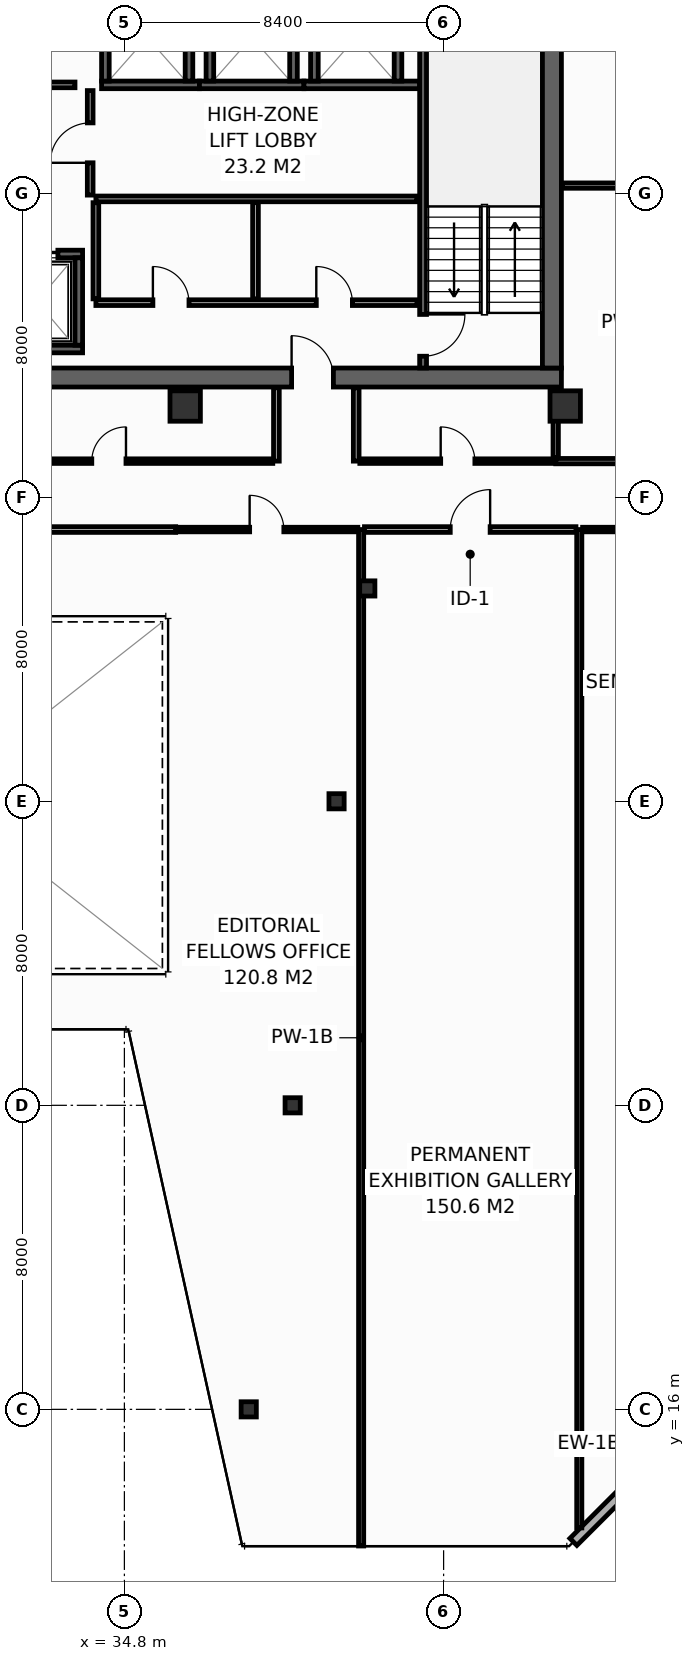
"""IFC4 building model, lengths in metres.
Left out: names, types, materials, properties, quantities, classifications, styles, units other than length and angle.
Written with IfcOpenShell. Run it as: python <this file> out.ifc"""

import sys

from ifc_helpers import new_model, si_unit, direction, frame, frame_2d, origin, origin_2d, place, context, subcontext, project, spatial, rectangle, hollow_rectangle, extrude, element, fill, save


model = new_model("IFC4")
c1 = context("Model", 3, precision=1e-05, world=origin(), true_north=direction((0.0, 1.0)))
c2 = subcontext(c1, "Body", "Model", "MODEL_VIEW")
j1 = project(units=[si_unit("LENGTHUNIT", "METRE"), si_unit("PLANEANGLEUNIT", "RADIAN")], contexts=[c1])
p1 = place(None, origin())
s1 = spatial("IfcSite", under=j1, at=p1, CompositionType="ELEMENT")
p2 = place(p1, origin())
s2 = spatial("IfcBuilding", under=s1, at=p2, CompositionType="ELEMENT")
p3 = place(p2, frame((0.0, 0.0, 186.6)))
s3 = spatial("IfcBuildingStorey", under=s2, at=p3, CompositionType="ELEMENT", Elevation=186.6)
p4 = place(p3, frame((13.6, 43.15, 0.0), z_axis=(0.0, 0.0, 1.0), x_axis=(1.0, 0.0, 0.0)))
e1 = element("IfcWall", 1, at=p4, inside=s3, PredefinedType="SHEAR", context=c2, shape_type="SweptSolid", body=[
    extrude(rectangle(XDim=32.7, YDim=0.5, at=frame_2d((16.35, 0.0))), origin(), (0.0, 0.0, 1.0), 3.55),
])
p5 = place(p4, frame((5.4, 0.0, 0.0)))
e2 = element("IfcOpeningElement", 2, at=p5, cuts=e1, PredefinedType="OPENING", context=c2, shape_type="SweptSolid", body=[
    extrude(rectangle(XDim=1.1, YDim=2.15, at=frame_2d((0.55, 1.075))), frame((0.0, 0.26, 0.0), z_axis=(0.0, -1.0, 0.0), x_axis=(1.0, 0.0, 0.0)), (0.0, 0.0, 1.0), 0.52),
])
p6 = place(p4, frame((25.6, 0.0, 0.0)))
e3 = element("IfcOpeningElement", 3, at=p6, cuts=e1, PredefinedType="OPENING", context=c2, shape_type="SweptSolid", body=[
    extrude(rectangle(XDim=1.1, YDim=2.15, at=frame_2d((0.55, 1.075))), frame((0.0, 0.26, 0.0), z_axis=(0.0, -1.0, 0.0), x_axis=(1.0, 0.0, 0.0)), (0.0, 0.0, 1.0), 0.52),
])
p7 = place(p3, frame((46.05, 43.4, 0.0), z_axis=(0.0, 0.0, 1.0), x_axis=(0.0, 1.0, 0.0)))
e4 = element("IfcWall", 4, at=p7, inside=s3, PredefinedType="SHEAR", context=c2, shape_type="SweptSolid", body=[
    extrude(rectangle(XDim=10.4, YDim=0.5, at=frame_2d((5.2, 0.0))), origin(), (0.0, 0.0, 1.0), 3.55),
])
for number, where, z_axis, x_axis in (
    (5, (36.4, 42.4, 0.0), (0.0, 0.0, 1.0), (1.0, 0.0, 0.0)),
    (6, (46.4, 42.4, 0.0), (0.0, 0.0, 1.0), (1.0, 0.0, 0.0)),
):
    element("IfcColumn", number, at=place(p3, frame(where, z_axis=z_axis, x_axis=x_axis)), inside=s3, PredefinedType="COLUMN", context=c2, shape_type="SweptSolid", body=[
        extrude(hollow_rectangle(XDim=0.8, YDim=0.8, WallThickness=0.036, at=origin_2d()), origin(), (0.0, 0.0, 1.0), 3.8),
    ])
for number, where, z_axis, x_axis in (
    (7, (38.072, 16.0, 0.0), (0.0, 0.0, 1.0), (1.0, 0.0, 0.0)),
    (8, (39.228, 24.0, 0.0), (0.0, 0.0, 1.0), (1.0, 0.0, 0.0)),
    (9, (40.383, 32.0, 0.0), (0.0, 0.0, 1.0), (1.0, 0.0, 0.0)),
    (10, (41.192, 37.6, 0.0), (0.0, 0.0, 1.0), (1.0, 0.0, 0.0)),
):
    element("IfcColumn", number, at=place(p3, frame(where, z_axis=z_axis, x_axis=x_axis)), inside=s3, PredefinedType="COLUMN", context=c2, shape_type="SweptSolid", body=[
        extrude(hollow_rectangle(XDim=0.4, YDim=0.4, WallThickness=0.016, at=origin_2d()), origin(), (0.0, 0.0, 1.0), 3.8),
    ])
p8 = place(p3, frame((31.125, 43.9, 0.0), z_axis=(0.0, 0.0, 1.0), x_axis=(1.0, 0.0, 0.0)))
e11 = element("IfcWall", 11, at=p8, inside=s3, PredefinedType="SHEAR", context=c2, shape_type="SweptSolid", body=[
    extrude(rectangle(XDim=2.575, YDim=0.2, at=frame_2d((1.288, 0.0))), origin(), (0.0, 0.0, 1.0), 3.55),
])
p9 = place(p3, frame((31.125, 46.4, 0.0), z_axis=(0.0, 0.0, 1.0), x_axis=(1.0, 0.0, 0.0)))
e12 = element("IfcWall", 12, at=p9, inside=s3, PredefinedType="SHEAR", context=c2, shape_type="SweptSolid", body=[
    extrude(rectangle(XDim=2.575, YDim=0.2, at=frame_2d((1.288, 0.0))), origin(), (0.0, 0.0, 1.0), 3.55),
])
p10 = place(p9, frame((0.825, 0.0, 0.0)))
e13 = element("IfcOpeningElement", 13, at=p10, cuts=e12, PredefinedType="OPENING", context=c2, shape_type="SweptSolid", body=[
    extrude(rectangle(XDim=1.1, YDim=2.2, at=frame_2d((0.55, 1.1))), frame((0.0, 0.11, 0.0), z_axis=(0.0, -1.0, 0.0), x_axis=(1.0, 0.0, 0.0)), (0.0, 0.0, 1.0), 0.22),
])
p11 = place(p3, frame((33.6, 44.0, 0.0), z_axis=(0.0, 0.0, 1.0), x_axis=(0.0, 1.0, 0.0)))
e14 = element("IfcWall", 14, at=p11, inside=s3, PredefinedType="SHEAR", context=c2, shape_type="SweptSolid", body=[
    extrude(rectangle(XDim=2.3, YDim=0.2, at=frame_2d((1.15, 0.0))), origin(), (0.0, 0.0, 1.0), 3.55),
])
p12 = place(p3, frame((34.2, 50.85, 0.0), z_axis=(0.0, 0.0, 1.0), x_axis=(1.0, 0.0, 0.0)))
e15 = element("IfcWall", 15, at=p12, inside=s3, PredefinedType="SHEAR", context=c2, shape_type="SweptSolid", body=[
    extrude(rectangle(XDim=2.575, YDim=0.2, at=frame_2d((1.288, 0.0))), origin(), (0.0, 0.0, 1.0), 3.55),
])
for number, where, z_axis, x_axis in (
    (16, (34.3, 50.95, 0.0), (0.0, 0.0, 1.0), (0.0, 1.0, 0.0)),
    (17, (36.5, 50.95, 0.0), (0.0, 0.0, 1.0), (0.0, 1.0, 0.0)),
):
    element("IfcWall", number, at=place(p3, frame(where, z_axis=z_axis, x_axis=x_axis)), inside=s3, PredefinedType="SHEAR", context=c2, shape_type="SweptSolid", body=[
        extrude(rectangle(XDim=2.3, YDim=0.2, at=frame_2d((1.15, 0.0))), origin(), (0.0, 0.0, 1.0), 3.55),
    ])
p13 = place(p3, frame((36.775, 50.85, 0.0), z_axis=(0.0, 0.0, 1.0), x_axis=(1.0, 0.0, 0.0)))
e18 = element("IfcWall", 18, at=p13, inside=s3, PredefinedType="SHEAR", context=c2, shape_type="SweptSolid", body=[
    extrude(rectangle(XDim=2.75, YDim=0.2, at=frame_2d((1.375, 0.0))), origin(), (0.0, 0.0, 1.0), 3.55),
])
for number, where, z_axis, x_axis in (
    (19, (37.05, 50.95, 0.0), (0.0, 0.0, 1.0), (0.0, 1.0, 0.0)),
    (20, (39.25, 50.95, 0.0), (0.0, 0.0, 1.0), (0.0, 1.0, 0.0)),
):
    element("IfcWall", number, at=place(p3, frame(where, z_axis=z_axis, x_axis=x_axis)), inside=s3, PredefinedType="SHEAR", context=c2, shape_type="SweptSolid", body=[
        extrude(rectangle(XDim=2.3, YDim=0.2, at=frame_2d((1.15, 0.0))), origin(), (0.0, 0.0, 1.0), 3.55),
    ])
p14 = place(p3, frame((39.525, 50.85, 0.0), z_axis=(0.0, 0.0, 1.0), x_axis=(1.0, 0.0, 0.0)))
e21 = element("IfcWall", 21, at=p14, inside=s3, PredefinedType="SHEAR", context=c2, shape_type="SweptSolid", body=[
    extrude(rectangle(XDim=3.045, YDim=0.2, at=frame_2d((1.522, 0.0))), origin(), (0.0, 0.0, 1.0), 3.55),
])
for number, where, z_axis, x_axis in (
    (22, (39.8, 50.95, 0.0), (0.0, 0.0, 1.0), (0.0, 1.0, 0.0)),
    (23, (42.0, 50.95, 0.0), (0.0, 0.0, 1.0), (0.0, 1.0, 0.0)),
):
    element("IfcWall", number, at=place(p3, frame(where, z_axis=z_axis, x_axis=x_axis)), inside=s3, PredefinedType="SHEAR", context=c2, shape_type="SweptSolid", body=[
        extrude(rectangle(XDim=2.3, YDim=0.2, at=frame_2d((1.15, 0.0))), origin(), (0.0, 0.0, 1.0), 3.55),
    ])
p15 = place(p3, frame((42.66, 53.8, 0.0), z_axis=(0.0, 0.0, 1.0), x_axis=(0.0, -1.0, 0.0)))
e24 = element("IfcWall", 24, at=p15, inside=s3, PredefinedType="SHEAR", context=c2, shape_type="SweptSolid", body=[
    extrude(rectangle(XDim=10.4, YDim=0.18, at=frame_2d((5.2, 0.0))), origin(), (0.0, 0.0, 1.0), 3.55),
])
p16 = place(p15, frame((8.99, 0.0, 0.0)))
e25 = element("IfcOpeningElement", 25, at=p16, cuts=e24, PredefinedType="OPENING", context=c2, shape_type="SweptSolid", body=[
    extrude(rectangle(XDim=1.1, YDim=2.15, at=frame_2d((0.55, 1.075))), frame((0.0, 0.1, 0.0), z_axis=(0.0, -1.0, 0.0), x_axis=(1.0, 0.0, 0.0)), (0.0, 0.0, 1.0), 0.2),
])
p17 = place(p3, frame((33.9, 47.95, 0.0), z_axis=(0.0, 0.0, 1.0), x_axis=(0.0, 1.0, 0.0)))
e26 = element("IfcWall", 26, at=p17, inside=s3, PredefinedType="PARTITIONING", context=c2, shape_type="SweptSolid", body=[
    extrude(rectangle(XDim=2.75, YDim=0.15, at=frame_2d((1.375, 0.0))), origin(), (0.0, 0.0, 1.0), 3.55),
])
p18 = place(p17, frame((0.85, 0.0, 0.0)))
e27 = element("IfcOpeningElement", 27, at=p18, cuts=e26, PredefinedType="OPENING", context=c2, shape_type="SweptSolid", body=[
    extrude(rectangle(XDim=1.05, YDim=2.15, at=frame_2d((0.525, 1.075))), frame((0.0, 0.085, 0.0), z_axis=(0.0, -1.0, 0.0), x_axis=(1.0, 0.0, 0.0)), (0.0, 0.0, 1.0), 0.17),
])
p19 = place(p3, frame((34.05, 45.12, 0.0), z_axis=(0.0, 0.0, 1.0), x_axis=(1.0, 0.0, 0.0)))
e28 = element("IfcWall", 28, at=p19, inside=s3, PredefinedType="PARTITIONING", context=c2, shape_type="SweptSolid", body=[
    extrude(rectangle(XDim=8.45, YDim=0.15, at=frame_2d((4.225, 0.0))), origin(), (0.0, 0.0, 1.0), 3.55),
])
p20 = place(p19, frame((1.5, 0.0, 0.0)))
e29 = element("IfcOpeningElement", 29, at=p20, cuts=e28, PredefinedType="OPENING", context=c2, shape_type="SweptSolid", body=[
    extrude(rectangle(XDim=0.95, YDim=2.15, at=frame_2d((0.475, 1.075))), frame((0.0, 0.085, 0.0), z_axis=(0.0, -1.0, 0.0), x_axis=(1.0, 0.0, 0.0)), (0.0, 0.0, 1.0), 0.17),
])
p21 = place(p19, frame((5.8, 0.0, 0.0)))
e30 = element("IfcOpeningElement", 30, at=p21, cuts=e28, PredefinedType="OPENING", context=c2, shape_type="SweptSolid", body=[
    extrude(rectangle(XDim=0.95, YDim=2.15, at=frame_2d((0.475, 1.075))), frame((0.0, 0.085, 0.0), z_axis=(0.0, -1.0, 0.0), x_axis=(1.0, 0.0, 0.0)), (0.0, 0.0, 1.0), 0.17),
])
p22 = place(p3, frame((34.05, 47.85, 0.0), z_axis=(0.0, 0.0, 1.0), x_axis=(1.0, 0.0, 0.0)))
e31 = element("IfcWall", 31, at=p22, inside=s3, PredefinedType="PARTITIONING", context=c2, shape_type="SweptSolid", body=[
    extrude(rectangle(XDim=8.45, YDim=0.15, at=frame_2d((4.225, 0.0))), origin(), (0.0, 0.0, 1.0), 3.55),
])
for number, where, z_axis, x_axis in (
    (32, (38.25, 45.22, 0.0), (0.0, 0.0, 1.0), (0.0, 1.0, 0.0)),
    (33, (34.05, 45.22, 0.0), (0.0, 0.0, 1.0), (0.0, 1.0, 0.0)),
):
    element("IfcWall", number, at=place(p3, frame(where, z_axis=z_axis, x_axis=x_axis)), inside=s3, PredefinedType="PARTITIONING", context=c2, shape_type="SweptSolid", body=[
        extrude(rectangle(XDim=2.53, YDim=0.15, at=frame_2d((1.265, 0.0))), origin(), (0.0, 0.0, 1.0), 3.55),
    ])
p23 = place(p3, frame((25.85, 50.85, 0.0), z_axis=(0.0, 0.0, 1.0), x_axis=(1.0, 0.0, 0.0)))
e34 = element("IfcWall", 34, at=p23, inside=s3, PredefinedType="PARTITIONING", context=c2, shape_type="SweptSolid", body=[
    extrude(rectangle(XDim=7.65, YDim=0.15, at=frame_2d((3.825, 0.0))), origin(), (0.0, 0.0, 1.0), 3.55),
])
p24 = place(p23, frame((1.25, 0.0, 0.0)))
e35 = element("IfcOpeningElement", 35, at=p24, cuts=e34, PredefinedType="OPENING", context=c2, shape_type="SweptSolid", body=[
    extrude(rectangle(XDim=0.95, YDim=2.15, at=frame_2d((0.475, 1.075))), frame((0.0, 0.085, 0.0), z_axis=(0.0, -1.0, 0.0), x_axis=(1.0, 0.0, 0.0)), (0.0, 0.0, 1.0), 0.17),
])
p25 = place(p3, frame((46.615, 12.513, 0.0), z_axis=(0.0, 0.0, 1.0), x_axis=(0.707135806771, 0.70707775441, 0.0)))
e36 = element("IfcWall", 36, at=p25, inside=s3, PredefinedType="STANDARD", context=c2, shape_type="SweptSolid", body=[
    extrude(rectangle(XDim=4.206, YDim=0.26, at=frame_2d((2.103, 0.0))), origin(), (0.0, 0.0, 1.0), 3.55),
])
p26 = place(p3, frame((46.15, 40.95, 0.0), z_axis=(0.0, 0.0, 1.0), x_axis=(1.0, 0.0, 0.0)))
e37 = element("IfcWall", 37, at=p26, inside=s3, PredefinedType="PARTITIONING", context=c2, shape_type="SweptSolid", body=[
    extrude(rectangle(XDim=4.05, YDim=0.14, at=frame_2d((2.025, 0.0))), origin(), (0.0, 0.0, 1.0), 3.55),
])
p27 = place(p3, frame((46.15, 41.04, 0.0), z_axis=(0.0, 0.0, 1.0), x_axis=(0.0, 1.0, 0.0)))
e38 = element("IfcWall", 38, at=p27, inside=s3, PredefinedType="PARTITIONING", context=c2, shape_type="SweptSolid", body=[
    extrude(rectangle(XDim=1.84, YDim=0.14, at=frame_2d((0.92, 0.0))), origin(), (0.0, 0.0, 1.0), 3.55),
])
p28 = place(p3, frame((46.32, 48.2, 0.0), z_axis=(0.0, 0.0, 1.0), x_axis=(1.0, 0.0, 0.0)))
e39 = element("IfcWall", 39, at=p28, inside=s3, PredefinedType="PARTITIONING", context=c2, shape_type="SweptSolid", body=[
    extrude(rectangle(XDim=3.88, YDim=0.14, at=frame_2d((1.94, 0.0))), origin(), (0.0, 0.0, 1.0), 3.55),
])
for number, where, z_axis, x_axis in (
    (40, (38.8, 40.95, 0.0), (0.0, 0.0, 1.0), (0.0, 1.0, 0.0)),
    (41, (40.9, 40.95, 0.0), (0.0, 0.0, 1.0), (0.0, 1.0, 0.0)),
):
    element("IfcWall", number, at=place(p3, frame(where, z_axis=z_axis, x_axis=x_axis)), inside=s3, PredefinedType="PARTITIONING", context=c2, shape_type="SweptSolid", body=[
        extrude(rectangle(XDim=1.93, YDim=0.15, at=frame_2d((0.965, 0.0))), origin(), (0.0, 0.0, 1.0), 3.55),
    ])
p29 = place(p3, frame((30.08, 40.95, 0.0), z_axis=(0.0, 0.0, 1.0), x_axis=(1.0, 0.0, 0.0)))
e42 = element("IfcWall", 42, at=p29, inside=s3, PredefinedType="PARTITIONING", context=c2, shape_type="SweptSolid", body=[
    extrude(rectangle(XDim=8.625, YDim=0.12, at=frame_2d((4.312, 0.0))), origin(), (0.0, 0.0, 1.0), 2.835),
])
p30 = place(p29, frame((3.862, 0.0, 0.0)))
e43 = element("IfcOpeningElement", 43, at=p30, cuts=e42, PredefinedType="OPENING", context=c2, shape_type="SweptSolid", body=[
    extrude(rectangle(XDim=0.9, YDim=2.1, at=frame_2d((0.45, 1.05))), frame((0.0, 0.07, 0.0), z_axis=(0.0, -1.0, 0.0), x_axis=(1.0, 0.0, 0.0)), (0.0, 0.0, 1.0), 0.14),
])
p31 = place(p3, frame((40.995, 40.95, 0.0), z_axis=(0.0, 0.0, 1.0), x_axis=(1.0, 0.0, 0.0)))
e44 = element("IfcWall", 44, at=p31, inside=s3, PredefinedType="PARTITIONING", context=c2, shape_type="SweptSolid", body=[
    extrude(rectangle(XDim=5.155, YDim=0.12, at=frame_2d((2.577, 0.0))), origin(), (0.0, 0.0, 1.0), 3.55),
])
p32 = place(p31, frame((2.128, 0.0, 0.0)))
e45 = element("IfcOpeningElement", 45, at=p32, cuts=e44, PredefinedType="OPENING", context=c2, shape_type="SweptSolid", body=[
    extrude(rectangle(XDim=0.9, YDim=2.1, at=frame_2d((0.45, 1.05))), frame((0.0, 0.07, 0.0), z_axis=(0.0, -1.0, 0.0), x_axis=(1.0, 0.0, 0.0)), (0.0, 0.0, 1.0), 0.14),
])
p33 = place(p3, frame((41.03, 12.405, 0.0), z_axis=(0.0, 0.0, 1.0), x_axis=(0.0, 1.0, 0.0)))
e46 = element("IfcWall", 46, at=p33, inside=s3, PredefinedType="PARTITIONING", context=c2, shape_type="SweptSolid", body=[
    extrude(rectangle(XDim=26.745, YDim=0.135, at=frame_2d((13.373, 0.0))), origin(), (0.0, 0.0, 1.0), 2.835),
])
p34 = place(p3, frame((46.77, 12.88, 0.0), z_axis=(0.0, 0.0, 1.0), x_axis=(0.0, 1.0, 0.0)))
e47 = element("IfcWall", 47, at=p34, inside=s3, PredefinedType="PARTITIONING", context=c2, shape_type="SweptSolid", body=[
    extrude(rectangle(XDim=26.27, YDim=0.135, at=frame_2d((13.135, 0.0))), origin(), (0.0, 0.0, 1.0), 2.835),
])
p35 = place(p3, frame((23.85, 39.15, 0.0), z_axis=(0.0, 0.0, 1.0), x_axis=(1.0, 0.0, 0.0)))
e48 = element("IfcWall", 48, at=p35, inside=s3, PredefinedType="PARTITIONING", context=c2, shape_type="SweptSolid", body=[
    extrude(rectangle(XDim=12.3, YDim=0.15, at=frame_2d((6.15, 0.0))), origin(), (0.0, 0.0, 1.0), 3.55),
])
p36 = place(p3, frame((36.15, 39.15, 0.0), z_axis=(0.0, 0.0, 1.0), x_axis=(1.0, 0.0, 0.0)))
e49 = element("IfcWall", 49, at=p36, inside=s3, PredefinedType="PARTITIONING", context=c2, shape_type="SweptSolid", body=[
    extrude(rectangle(XDim=4.792, YDim=0.12, at=frame_2d((2.396, 0.0))), origin(), (0.0, 0.0, 1.0), 2.835),
])
p37 = place(p36, frame((1.946, 0.0, 0.0)))
e50 = element("IfcOpeningElement", 50, at=p37, cuts=e49, PredefinedType="OPENING", context=c2, shape_type="SweptSolid", body=[
    extrude(rectangle(XDim=0.9, YDim=2.1, at=frame_2d((0.45, 1.05))), frame((0.0, 0.07, 0.0), z_axis=(0.0, -1.0, 0.0), x_axis=(1.0, 0.0, 0.0)), (0.0, 0.0, 1.0), 0.14),
])
p38 = place(p3, frame((41.117, 39.15, 0.0), z_axis=(0.0, 0.0, 1.0), x_axis=(1.0, 0.0, 0.0)))
e51 = element("IfcWall", 51, at=p38, inside=s3, PredefinedType="PARTITIONING", context=c2, shape_type="SweptSolid", body=[
    extrude(rectangle(XDim=5.565, YDim=0.15, at=frame_2d((2.783, 0.0))), origin(), (0.0, 0.0, 1.0), 3.55),
])
p39 = place(p38, frame((2.257, 0.0, 0.0)))
e52 = element("IfcOpeningElement", 52, at=p39, cuts=e51, PredefinedType="OPENING", context=c2, shape_type="SweptSolid", body=[
    extrude(rectangle(XDim=1.05, YDim=2.15, at=frame_2d((0.525, 1.075))), frame((0.0, 0.085, 0.0), z_axis=(0.0, -1.0, 0.0), x_axis=(1.0, 0.0, 0.0)), (0.0, 0.0, 1.0), 0.17),
])
p40 = place(p3, frame((46.857, 39.15, 0.0), z_axis=(0.0, 0.0, 1.0), x_axis=(1.0, 0.0, 0.0)))
e53 = element("IfcWall", 53, at=p40, inside=s3, PredefinedType="PARTITIONING", context=c2, shape_type="SweptSolid", body=[
    extrude(rectangle(XDim=6.809, YDim=0.12, at=frame_2d((3.404, 0.0))), origin(), (0.0, 0.0, 1.0), 3.035),
])
p41 = place(p40, frame((2.954, 0.0, 0.0)))
e54 = element("IfcOpeningElement", 54, at=p41, cuts=e53, PredefinedType="OPENING", context=c2, shape_type="SweptSolid", body=[
    extrude(rectangle(XDim=0.9, YDim=2.1, at=frame_2d((0.45, 1.05))), frame((0.0, 0.07, 0.0), z_axis=(0.0, -1.0, 0.0), x_axis=(1.0, 0.0, 0.0)), (0.0, 0.0, 1.0), 0.14),
])
p42 = place(p10, origin())
e55 = element("IfcDoor", 55, at=p42, inside=s3, OperationType="SLIDING_TO_LEFT", PredefinedType="DOOR", context=c2, shape_type="SweptSolid", body=[
    extrude(rectangle(XDim=1.1, YDim=2.2, at=frame_2d((0.55, 1.1))), frame((0.0, 0.025, 0.0), z_axis=(0.0, -1.0, 0.0), x_axis=(1.0, 0.0, 0.0)), (0.0, 0.0, 1.0), 0.05),
])
fill(e13, e55)
p43 = place(p16, origin())
e56 = element("IfcDoor", 56, at=p43, inside=s3, OperationType="SINGLE_SWING_LEFT", PredefinedType="DOOR", context=c2, shape_type="SweptSolid", body=[
    extrude(rectangle(XDim=1.1, YDim=2.15, at=frame_2d((0.55, 1.075))), frame((0.0, 0.025, 0.0), z_axis=(0.0, -1.0, 0.0), x_axis=(1.0, 0.0, 0.0)), (0.0, 0.0, 1.0), 0.05),
])
fill(e25, e56)
p44 = place(p6, origin())
e57 = element("IfcDoor", 57, at=p44, inside=s3, OperationType="SINGLE_SWING_LEFT", PredefinedType="DOOR", context=c2, shape_type="SweptSolid", body=[
    extrude(rectangle(XDim=1.1, YDim=2.15, at=frame_2d((0.55, 1.075))), frame((0.0, 0.025, 0.0), z_axis=(0.0, -1.0, 0.0), x_axis=(1.0, 0.0, 0.0)), (0.0, 0.0, 1.0), 0.05),
])
fill(e3, e57)
p45 = place(p18, origin())
e58 = element("IfcDoor", 58, at=p45, inside=s3, OperationType="SINGLE_SWING_LEFT", PredefinedType="DOOR", context=c2, shape_type="SweptSolid", body=[
    extrude(rectangle(XDim=1.05, YDim=2.15, at=frame_2d((0.525, 1.075))), frame((0.0, 0.025, 0.0), z_axis=(0.0, -1.0, 0.0), x_axis=(1.0, 0.0, 0.0)), (0.0, 0.0, 1.0), 0.05),
])
fill(e27, e58)
p46 = place(p20, origin())
e59 = element("IfcDoor", 59, at=p46, inside=s3, OperationType="SINGLE_SWING_LEFT", PredefinedType="DOOR", context=c2, shape_type="SweptSolid", body=[
    extrude(rectangle(XDim=0.95, YDim=2.15, at=frame_2d((0.475, 1.075))), frame((0.0, 0.025, 0.0), z_axis=(0.0, -1.0, 0.0), x_axis=(1.0, 0.0, 0.0)), (0.0, 0.0, 1.0), 0.05),
])
fill(e29, e59)
p47 = place(p21, origin())
e60 = element("IfcDoor", 60, at=p47, inside=s3, OperationType="SINGLE_SWING_LEFT", PredefinedType="DOOR", context=c2, shape_type="SweptSolid", body=[
    extrude(rectangle(XDim=0.95, YDim=2.15, at=frame_2d((0.475, 1.075))), frame((0.0, 0.025, 0.0), z_axis=(0.0, -1.0, 0.0), x_axis=(1.0, 0.0, 0.0)), (0.0, 0.0, 1.0), 0.05),
])
fill(e30, e60)
p48 = place(p30, origin())
e61 = element("IfcDoor", 61, at=p48, inside=s3, OperationType="SINGLE_SWING_RIGHT", PredefinedType="DOOR", context=c2, shape_type="SweptSolid", body=[
    extrude(rectangle(XDim=0.9, YDim=2.1, at=frame_2d((0.45, 1.05))), frame((0.0, 0.025, 0.0), z_axis=(0.0, -1.0, 0.0), x_axis=(1.0, 0.0, 0.0)), (0.0, 0.0, 1.0), 0.05),
])
fill(e43, e61)
p49 = place(p32, origin())
e62 = element("IfcDoor", 62, at=p49, inside=s3, OperationType="SINGLE_SWING_LEFT", PredefinedType="DOOR", context=c2, shape_type="SweptSolid", body=[
    extrude(rectangle(XDim=0.9, YDim=2.1, at=frame_2d((0.45, 1.05))), frame((0.0, 0.025, 0.0), z_axis=(0.0, -1.0, 0.0), x_axis=(1.0, 0.0, 0.0)), (0.0, 0.0, 1.0), 0.05),
])
fill(e45, e62)
p50 = place(p37, origin())
e63 = element("IfcDoor", 63, at=p50, inside=s3, OperationType="SINGLE_SWING_LEFT", PredefinedType="DOOR", context=c2, shape_type="SweptSolid", body=[
    extrude(rectangle(XDim=0.9, YDim=2.1, at=frame_2d((0.45, 1.05))), frame((0.0, 0.025, 0.0), z_axis=(0.0, -1.0, 0.0), x_axis=(1.0, 0.0, 0.0)), (0.0, 0.0, 1.0), 0.05),
])
fill(e50, e63)
p51 = place(p39, origin())
e64 = element("IfcDoor", 64, at=p51, inside=s3, OperationType="SINGLE_SWING_RIGHT", PredefinedType="DOOR", context=c2, shape_type="SweptSolid", body=[
    extrude(rectangle(XDim=1.05, YDim=2.15, at=frame_2d((0.525, 1.075))), frame((0.0, 0.025, 0.0), z_axis=(0.0, -1.0, 0.0), x_axis=(1.0, 0.0, 0.0)), (0.0, 0.0, 1.0), 0.05),
])
fill(e52, e64)
save(model, sys.argv[1])
